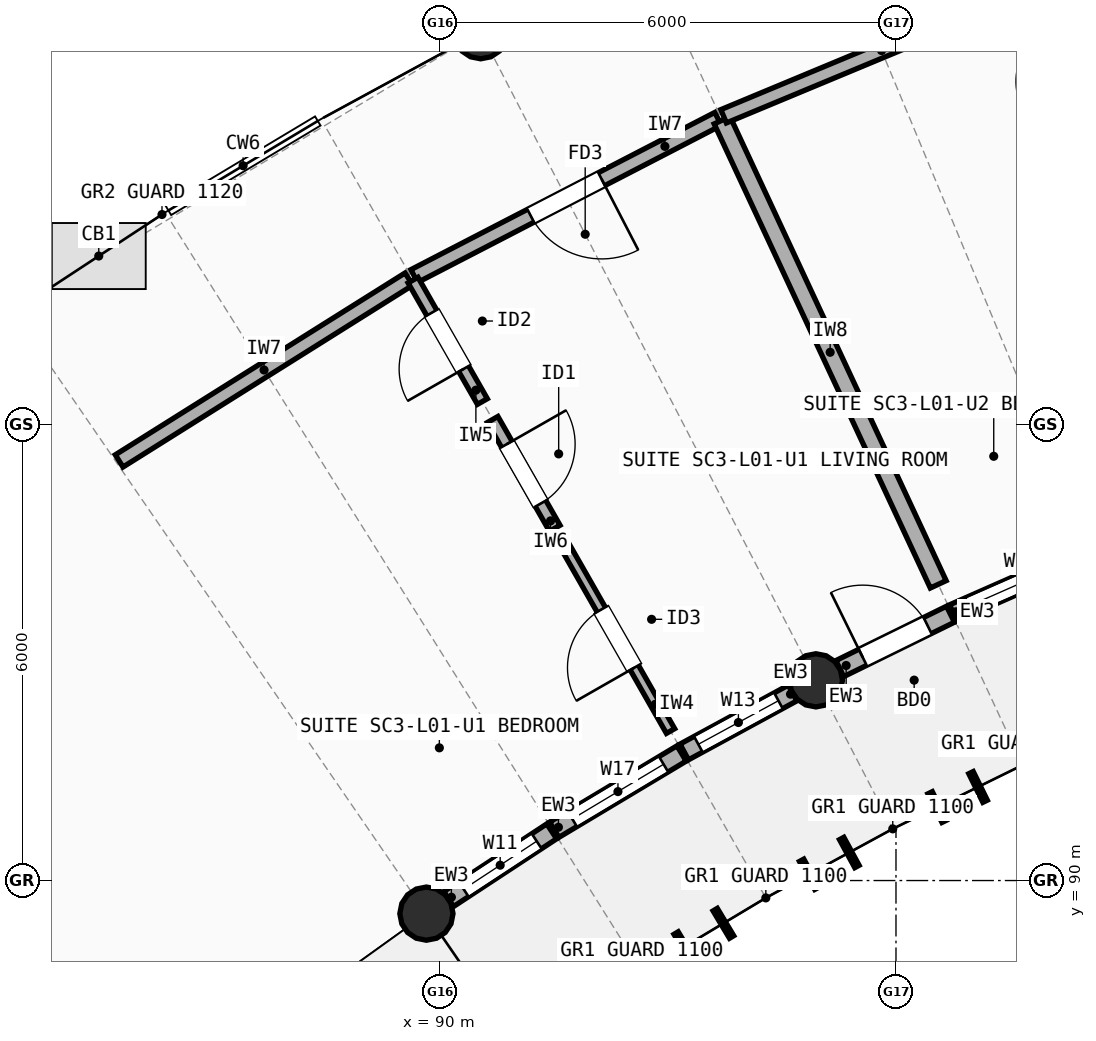
"""IFC4 building model, lengths in metres.
Left out: names, types, materials, properties, quantities, classifications, styles, units other than length and angle.
Written with IfcOpenShell. Run it as: python <this file> out.ifc"""

import sys

from ifc_helpers import new_model, si_unit, direction, frame, frame_2d, origin, origin_2d, place, context, subcontext, project, spatial, rectangle, circle, extrude, element, fill, save


model = new_model("IFC4")
c1 = context("Model", 3, precision=1e-05, world=origin(), true_north=direction((0.0, 1.0)))
c2 = subcontext(c1, "Body", "Model", "MODEL_VIEW")
j1 = project(units=[si_unit("LENGTHUNIT", "METRE"), si_unit("PLANEANGLEUNIT", "RADIAN")], contexts=[c1])
p1 = place(None, origin())
s1 = spatial("IfcSite", under=j1, at=p1, CompositionType="ELEMENT")
p2 = place(p1, origin())
s2 = spatial("IfcBuilding", under=s1, at=p2, CompositionType="ELEMENT")
p3 = place(p2, frame((0.0, 0.0, 4.5)))
s3 = spatial("IfcBuildingStorey", under=s2, at=p3, CompositionType="ELEMENT", Elevation=4.5)
for number, where, z_axis, x_axis in (
    (1, (89.822, 89.564, 0.0), (0.0, 0.0, 1.0), (1.0, 0.0, 0.0)),
    (2, (94.947, 92.634, 0.0), (0.0, 0.0, 1.0), (1.0, 0.0, 0.0)),
    (3, (90.536, 101.161, 0.0), (0.0, 0.0, 1.0), (1.0, 0.0, 0.0)),
):
    element("IfcColumn", number, at=place(p3, frame(where, z_axis=z_axis, x_axis=x_axis)), inside=s3, PredefinedType="COLUMN", context=c2, shape_type="SweptSolid", body=[
        extrude(circle(Radius=0.35, at=origin_2d()), origin(), (0.0, 0.0, 1.0), 2.948),
    ])
p4 = place(p3, frame((90.114, 89.757, 0.0), z_axis=(0.0, 0.0, 1.0), x_axis=(0.835873156341, 0.548922641644, 0.0)))
e4 = element("IfcWall", 4, at=p4, inside=s3, PredefinedType="STANDARD", context=c2, shape_type="SweptSolid", body=[
    extrude(rectangle(XDim=1.623, YDim=0.235, at=frame_2d((0.811, 0.0))), origin(), (0.0, 0.0, 1.0), 2.684),
])
p5 = place(p4, frame((0.236, 0.0, 0.85)))
e5 = element("IfcOpeningElement", 5, at=p5, cuts=e4, PredefinedType="OPENING", context=c2, shape_type="SweptSolid", body=[
    extrude(rectangle(XDim=1.15, YDim=1.45, at=frame_2d((0.575, 0.725))), frame((0.0, 0.127, 0.0), z_axis=(0.0, -1.0, 0.0), x_axis=(1.0, 0.0, 0.0)), (0.0, 0.0, 1.0), 0.255),
])
p6 = place(p3, frame((91.504, 90.668, 0.0), z_axis=(0.0, 0.0, 1.0), x_axis=(0.85787888411, 0.51385194385, 0.0)))
e6 = element("IfcWall", 6, at=p6, inside=s3, PredefinedType="STANDARD", context=c2, shape_type="SweptSolid", body=[
    extrude(rectangle(XDim=1.952, YDim=0.235, at=frame_2d((0.976, 0.0))), origin(), (0.0, 0.0, 1.0), 2.684),
])
p7 = place(p6, frame((0.276, 0.0, 0.85)))
e7 = element("IfcOpeningElement", 7, at=p7, cuts=e6, PredefinedType="OPENING", context=c2, shape_type="SweptSolid", body=[
    extrude(rectangle(XDim=1.4, YDim=1.5, at=frame_2d((0.7, 0.75))), frame((0.0, 0.127, 0.0), z_axis=(0.0, -1.0, 0.0), x_axis=(1.0, 0.0, 0.0)), (0.0, 0.0, 1.0), 0.255),
])
p8 = place(p3, frame((93.214, 91.692, 0.0), z_axis=(0.0, 0.0, 1.0), x_axis=(0.878452871629, 0.477828999044, 0.0)))
e8 = element("IfcWall", 8, at=p8, inside=s3, PredefinedType="STANDARD", context=c2, shape_type="SweptSolid", body=[
    extrude(rectangle(XDim=1.622, YDim=0.235, at=frame_2d((0.811, 0.0))), origin(), (0.0, 0.0, 1.0), 2.684),
])
p9 = place(p8, frame((0.211, 0.0, 0.85)))
e9 = element("IfcOpeningElement", 9, at=p9, cuts=e8, PredefinedType="OPENING", context=c2, shape_type="SweptSolid", body=[
    extrude(rectangle(XDim=1.2, YDim=1.45, at=frame_2d((0.6, 0.725))), frame((0.0, 0.127, 0.0), z_axis=(0.0, -1.0, 0.0), x_axis=(1.0, 0.0, 0.0)), (0.0, 0.0, 1.0), 0.255),
])
p10 = place(p3, frame((95.261, 92.788, 0.0), z_axis=(0.0, 0.0, 1.0), x_axis=(0.897535518759, 0.440942164649, 0.0)))
e10 = element("IfcWall", 10, at=p10, inside=s3, PredefinedType="STANDARD", context=c2, shape_type="SweptSolid", body=[
    extrude(rectangle(XDim=1.622, YDim=0.235, at=frame_2d((0.811, 0.0))), origin(), (0.0, 0.0, 1.0), 2.684),
])
p11 = place(p10, frame((0.336, 0.0, 0.0)))
e11 = element("IfcOpeningElement", 11, at=p11, cuts=e10, PredefinedType="OPENING", context=c2, shape_type="SweptSolid", body=[
    extrude(rectangle(XDim=0.95, YDim=2.12, at=frame_2d((0.475, 1.06))), frame((0.0, 0.127, 0.0), z_axis=(0.0, -1.0, 0.0), x_axis=(1.0, 0.0, 0.0)), (0.0, 0.0, 1.0), 0.255),
])
p12 = place(p3, frame((96.753, 93.521, 0.0), z_axis=(0.0, 0.0, 1.0), x_axis=(0.915126852478, 0.403166025197, 0.0)))
e12 = element("IfcWall", 12, at=p12, inside=s3, PredefinedType="STANDARD", context=c2, shape_type="SweptSolid", body=[
    extrude(rectangle(XDim=1.952, YDim=0.235, at=frame_2d((0.976, 0.0))), origin(), (0.0, 0.0, 1.0), 2.684),
])
p13 = place(p12, frame((0.226, 0.0, 0.85)))
e13 = element("IfcOpeningElement", 13, at=p13, cuts=e12, PredefinedType="OPENING", context=c2, shape_type="SweptSolid", body=[
    extrude(rectangle(XDim=1.5, YDim=1.5, at=frame_2d((0.75, 0.75))), frame((0.0, 0.127, 0.0), z_axis=(0.0, -1.0, 0.0), x_axis=(1.0, 0.0, 0.0)), (0.0, 0.0, 1.0), 0.255),
])
p14 = place(p3, frame((85.779, 95.521, 0.0), z_axis=(0.0, 0.0, 1.0), x_axis=(0.847037081085, 0.531533802563, 0.0)))
e14 = element("IfcWall", 14, at=p14, inside=s3, PredefinedType="SOLIDWALL", context=c2, shape_type="SweptSolid", body=[
    extrude(rectangle(XDim=4.501, YDim=0.19, at=frame_2d((2.25, 0.0))), origin(), (0.0, 0.0, 1.0), 2.742),
])
p15 = place(p3, frame((89.661, 97.953, 0.0), z_axis=(0.0, 0.0, 1.0), x_axis=(0.888203141908, 0.459450953536, 0.0)))
e15 = element("IfcWall", 15, at=p15, inside=s3, PredefinedType="SOLIDWALL", context=c2, shape_type="SweptSolid", body=[
    extrude(rectangle(XDim=4.501, YDim=0.19, at=frame_2d((2.25, 0.0))), origin(), (0.0, 0.0, 1.0), 2.722),
])
p16 = place(p15, frame((1.726, 0.0, 0.0)))
e16 = element("IfcOpeningElement", 16, at=p16, cuts=e15, PredefinedType="OPENING", context=c2, shape_type="SweptSolid", body=[
    extrude(rectangle(XDim=1.05, YDim=2.15, at=frame_2d((0.525, 1.075))), frame((0.0, 0.105, 0.0), z_axis=(0.0, -1.0, 0.0), x_axis=(1.0, 0.0, 0.0)), (0.0, 0.0, 1.0), 0.21),
])
p17 = place(p3, frame((93.034, 91.967, 0.0), z_axis=(0.0, 0.0, 1.0), x_axis=(-0.495951127449, 0.868350435701, 0.0)))
e17 = element("IfcWall", 17, at=p17, inside=s3, PredefinedType="PARTITIONING", context=c2, shape_type="SweptSolid", body=[
    extrude(rectangle(XDim=2.8, YDim=0.125, at=frame_2d((1.4, 0.0))), origin(), (0.0, 0.0, 1.0), 2.762),
])
p18 = place(p17, frame((0.96, 0.0, 0.0)))
e18 = element("IfcOpeningElement", 18, at=p18, cuts=e17, PredefinedType="OPENING", context=c2, shape_type="SweptSolid", body=[
    extrude(rectangle(XDim=0.88, YDim=2.1, at=frame_2d((0.44, 1.05))), frame((0.0, 0.073, 0.0), z_axis=(0.0, -1.0, 0.0), x_axis=(1.0, 0.0, 0.0)), (0.0, 0.0, 1.0), 0.145),
])
p19 = place(p3, frame((91.51, 94.635, 0.0), z_axis=(0.0, 0.0, 1.0), x_axis=(-0.49583578404, 0.868416302971, 0.0)))
e19 = element("IfcWall", 19, at=p19, inside=s3, PredefinedType="PLUMBINGWALL", context=c2, shape_type="SweptSolid", body=[
    extrude(rectangle(XDim=1.648, YDim=0.16, at=frame_2d((0.824, 0.0))), origin(), (0.0, 0.0, 1.0), 2.762),
])
p20 = place(p19, frame((0.374, 0.0, 0.0)))
e20 = element("IfcOpeningElement", 20, at=p20, cuts=e19, PredefinedType="OPENING", context=c2, shape_type="SweptSolid", body=[
    extrude(rectangle(XDim=0.9, YDim=2.1, at=frame_2d((0.45, 1.05))), frame((0.0, 0.09, 0.0), z_axis=(0.0, -1.0, 0.0), x_axis=(1.0, 0.0, 0.0)), (0.0, 0.0, 1.0), 0.18),
])
p21 = place(p3, frame((90.558, 96.302, 0.0), z_axis=(0.0, 0.0, 1.0), x_axis=(-0.495938892217, 0.868357423638, 0.0)))
e21 = element("IfcWall", 21, at=p21, inside=s3, PredefinedType="PARTITIONING", context=c2, shape_type="SweptSolid", body=[
    extrude(rectangle(XDim=1.84, YDim=0.15, at=frame_2d((0.92, 0.0))), origin(), (0.0, 0.0, 1.0), 2.762),
])
p22 = place(p21, frame((0.495, 0.0, 0.0)))
e22 = element("IfcOpeningElement", 22, at=p22, cuts=e21, PredefinedType="OPENING", context=c2, shape_type="SweptSolid", body=[
    extrude(rectangle(XDim=0.85, YDim=2.1, at=frame_2d((0.425, 1.05))), frame((0.0, 0.085, 0.0), z_axis=(0.0, -1.0, 0.0), x_axis=(1.0, 0.0, 0.0)), (0.0, 0.0, 1.0), 0.17),
])
p23 = place(p3, frame((96.556, 93.897, 0.0), z_axis=(0.0, 0.0, 1.0), x_axis=(-0.422206763189, 0.906499558256, 0.0)))
e23 = element("IfcWall", 23, at=p23, inside=s3, PredefinedType="SOLIDWALL", context=c2, shape_type="SweptSolid", body=[
    extrude(rectangle(XDim=6.736, YDim=0.23, at=frame_2d((3.368, 0.0))), origin(), (0.0, 0.0, 1.0), 2.742),
])
p24 = place(p3, frame((93.732, 100.055, 0.0), z_axis=(0.0, 0.0, 1.0), x_axis=(0.923267760269, 0.384157054925, 0.0)))
e24 = element("IfcWall", 24, at=p24, inside=s3, PredefinedType="SOLIDWALL", context=c2, shape_type="SweptSolid", body=[
    extrude(rectangle(XDim=4.501, YDim=0.19, at=frame_2d((2.251, 0.0))), origin(), (0.0, 0.0, 1.0), 2.762),
])
p25 = place(p5, origin())
e25 = element("IfcWindow", 25, at=p25, inside=s3, PartitioningType="SINGLE_PANEL", PredefinedType="WINDOW", context=c2, shape_type="SweptSolid", body=[
    extrude(rectangle(XDim=1.15, YDim=1.45, at=frame_2d((0.575, 0.725))), frame((0.0, 0.03, 0.0), z_axis=(0.0, -1.0, 0.0), x_axis=(1.0, 0.0, 0.0)), (0.0, 0.0, 1.0), 0.06),
])
fill(e5, e25)
p26 = place(p7, origin())
e26 = element("IfcWindow", 26, at=p26, inside=s3, PartitioningType="SINGLE_PANEL", PredefinedType="WINDOW", context=c2, shape_type="SweptSolid", body=[
    extrude(rectangle(XDim=1.4, YDim=1.5, at=frame_2d((0.7, 0.75))), frame((0.0, 0.03, 0.0), z_axis=(0.0, -1.0, 0.0), x_axis=(1.0, 0.0, 0.0)), (0.0, 0.0, 1.0), 0.06),
])
fill(e7, e26)
p27 = place(p9, origin())
e27 = element("IfcWindow", 27, at=p27, inside=s3, PartitioningType="SINGLE_PANEL", PredefinedType="WINDOW", context=c2, shape_type="SweptSolid", body=[
    extrude(rectangle(XDim=1.2, YDim=1.45, at=frame_2d((0.6, 0.725))), frame((0.0, 0.03, 0.0), z_axis=(0.0, -1.0, 0.0), x_axis=(1.0, 0.0, 0.0)), (0.0, 0.0, 1.0), 0.06),
])
fill(e9, e27)
p28 = place(p11, frame((0.95, 0.0, 0.0), z_axis=(0.0, 0.0, 1.0), x_axis=(-1.0, 0.0, 0.0)))
e28 = element("IfcDoor", 28, at=p28, inside=s3, OperationType="SINGLE_SWING_LEFT", PredefinedType="DOOR", context=c2, shape_type="SweptSolid", body=[
    extrude(rectangle(XDim=0.95, YDim=2.12, at=frame_2d((0.475, 1.06))), frame((0.0, 0.025, 0.0), z_axis=(0.0, -1.0, 0.0), x_axis=(1.0, 0.0, 0.0)), (0.0, 0.0, 1.0), 0.05),
])
fill(e11, e28)
p29 = place(p13, origin())
e29 = element("IfcWindow", 29, at=p29, inside=s3, PartitioningType="SINGLE_PANEL", PredefinedType="WINDOW", context=c2, shape_type="SweptSolid", body=[
    extrude(rectangle(XDim=1.5, YDim=1.5, at=frame_2d((0.75, 0.75))), frame((0.0, 0.03, 0.0), z_axis=(0.0, -1.0, 0.0), x_axis=(1.0, 0.0, 0.0)), (0.0, 0.0, 1.0), 0.06),
])
fill(e13, e29)
p30 = place(p16, origin())
e30 = element("IfcDoor", 30, at=p30, inside=s3, OperationType="SINGLE_SWING_RIGHT", PredefinedType="DOOR", context=c2, shape_type="SweptSolid", body=[
    extrude(rectangle(XDim=1.05, YDim=2.15, at=frame_2d((0.525, 1.075))), frame((0.0, 0.025, 0.0), z_axis=(0.0, -1.0, 0.0), x_axis=(1.0, 0.0, 0.0)), (0.0, 0.0, 1.0), 0.05),
])
fill(e16, e30)
p31 = place(p18, origin())
e31 = element("IfcDoor", 31, at=p31, inside=s3, OperationType="SINGLE_SWING_LEFT", PredefinedType="DOOR", context=c2, shape_type="SweptSolid", body=[
    extrude(rectangle(XDim=0.88, YDim=2.1, at=frame_2d((0.44, 1.05))), frame((0.0, 0.025, 0.0), z_axis=(0.0, -1.0, 0.0), x_axis=(1.0, 0.0, 0.0)), (0.0, 0.0, 1.0), 0.05),
])
fill(e18, e31)
p32 = place(p20, origin())
e32 = element("IfcDoor", 32, at=p32, inside=s3, OperationType="SINGLE_SWING_RIGHT", PredefinedType="DOOR", context=c2, shape_type="SweptSolid", body=[
    extrude(rectangle(XDim=0.9, YDim=2.1, at=frame_2d((0.45, 1.05))), frame((0.0, 0.025, 0.0), z_axis=(0.0, -1.0, 0.0), x_axis=(1.0, 0.0, 0.0)), (0.0, 0.0, 1.0), 0.05),
])
fill(e20, e32)
p33 = place(p22, origin())
e33 = element("IfcDoor", 33, at=p33, inside=s3, OperationType="SINGLE_SWING_LEFT", PredefinedType="DOOR", context=c2, shape_type="SweptSolid", body=[
    extrude(rectangle(XDim=0.85, YDim=2.1, at=frame_2d((0.425, 1.05))), frame((0.0, 0.025, 0.0), z_axis=(0.0, -1.0, 0.0), x_axis=(1.0, 0.0, 0.0)), (0.0, 0.0, 1.0), 0.05),
])
fill(e22, e33)
save(model, sys.argv[1])
